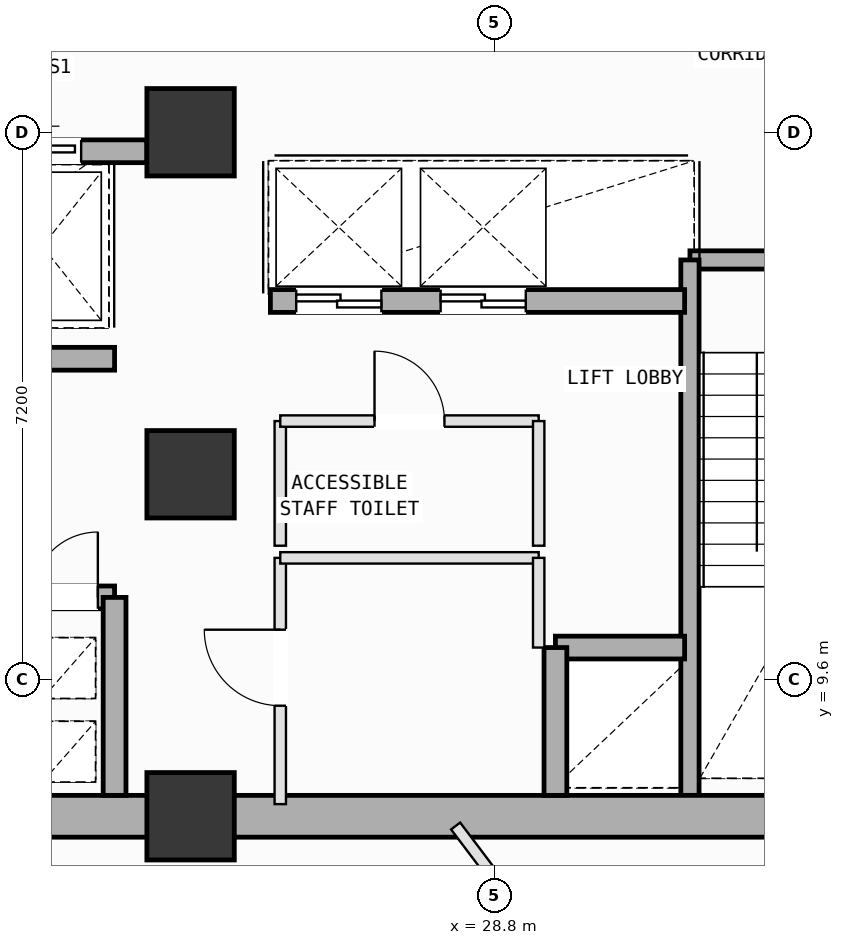
"""IFC4 building model, lengths in metres.
Left out: names, types, materials, properties, quantities, classifications, styles, units other than length and angle.
Written with IfcOpenShell. Run it as: python <this file> out.ifc"""

import sys

from ifc_helpers import new_model, si_unit, direction, frame, frame_2d, origin, origin_2d, place, context, subcontext, project, spatial, rectangle, extrude, element, fill, save


model = new_model("IFC4")
c1 = context("Model", 3, precision=1e-05, world=origin(), true_north=direction((0.0, 1.0)))
c2 = subcontext(c1, "Body", "Model", "MODEL_VIEW")
j1 = project(units=[si_unit("LENGTHUNIT", "METRE"), si_unit("PLANEANGLEUNIT", "RADIAN")], contexts=[c1])
p1 = place(None, origin())
s1 = spatial("IfcSite", under=j1, at=p1, CompositionType="ELEMENT")
p2 = place(p1, origin())
s2 = spatial("IfcBuilding", under=s1, at=p2, CompositionType="ELEMENT")
p3 = place(p2, frame((0.0, 0.0, 181.8)))
s3 = spatial("IfcBuildingStorey", under=s2, at=p3, CompositionType="ELEMENT", Elevation=181.8)
for number, where, z_axis, x_axis in (
    (1, (24.8, 7.8, 0.0), (0.0, 0.0, 1.0), (1.0, 0.0, 0.0)),
    (2, (24.8, 12.3, 0.0), (0.0, 0.0, 1.0), (1.0, 0.0, 0.0)),
    (3, (24.8, 16.8, 0.0), (0.0, 0.0, 1.0), (1.0, 0.0, 0.0)),
):
    element("IfcColumn", number, at=place(p3, frame(where, z_axis=z_axis, x_axis=x_axis)), inside=s3, PredefinedType="COLUMN", context=c2, shape_type="SweptSolid", body=[
        extrude(rectangle(XDim=1.15, YDim=1.15, at=origin_2d()), origin(), (0.0, 0.0, 1.0), 4.0),
    ])
p4 = place(p3, frame((31.37, 15.12, 0.0), z_axis=(0.0, 0.0, 1.0), x_axis=(1.0, 0.0, 0.0)))
e4 = element("IfcWall", 4, at=p4, inside=s3, PredefinedType="SOLIDWALL", context=c2, shape_type="SweptSolid", body=[
    extrude(rectangle(XDim=3.46, YDim=0.24, at=frame_2d((1.73, 0.0))), origin(), (0.0, 0.0, 1.0), 3.78),
])
p5 = place(p4, frame((2.14, 0.0, 0.0)))
e5 = element("IfcOpeningElement", 5, at=p5, cuts=e4, PredefinedType="OPENING", context=c2, shape_type="SweptSolid", body=[
    extrude(rectangle(XDim=1.1, YDim=2.15, at=frame_2d((0.55, 1.075))), frame((0.0, 0.13, 0.0), z_axis=(0.0, -1.0, 0.0), x_axis=(1.0, 0.0, 0.0)), (0.0, 0.0, 1.0), 0.26),
])
p6 = place(p3, frame((31.37, 8.075, 0.0), z_axis=(0.0, 0.0, 1.0), x_axis=(0.0, 1.0, 0.0)))
e6 = element("IfcWall", 6, at=p6, inside=s3, PredefinedType="SOLIDWALL", context=c2, shape_type="SweptSolid", body=[
    extrude(rectangle(XDim=7.045, YDim=0.24, at=frame_2d((3.522, 0.0))), origin(), (0.0, 0.0, 1.0), 3.78),
])
for number, where, z_axis, x_axis in (
    (7, (14.0, 7.8, 0.0), (0.0, 0.0, 1.0), (1.0, 0.0, 0.0)),
    (8, (24.8, 7.8, 0.0), (0.0, 0.0, 1.0), (1.0, 0.0, 0.0)),
):
    element("IfcWall", number, at=place(p3, frame(where, z_axis=z_axis, x_axis=x_axis)), inside=s3, PredefinedType="SHEAR", context=c2, shape_type="SweptSolid", body=[
        extrude(rectangle(XDim=10.8, YDim=0.55, at=frame_2d((5.4, 0.0))), origin(), (0.0, 0.0, 1.0), 3.78),
    ])
p7 = place(p3, frame((19.85, 16.55, 0.0), z_axis=(0.0, 0.0, 1.0), x_axis=(1.0, 0.0, 0.0)))
e9 = element("IfcWall", 9, at=p7, inside=s3, PredefinedType="SOLIDWALL", context=c2, shape_type="SweptSolid", body=[
    extrude(rectangle(XDim=4.375, YDim=0.3, at=frame_2d((2.188, 0.0))), origin(), (0.0, 0.0, 1.0), 3.78),
])
p8 = place(p7, frame((0.475, 0.0, 0.0)))
e10 = element("IfcOpeningElement", 10, at=p8, cuts=e9, PredefinedType="OPENING", context=c2, shape_type="SweptSolid", body=[
    extrude(rectangle(XDim=1.25, YDim=2.18, at=frame_2d((0.625, 1.09))), frame((0.0, 0.16, 0.0), z_axis=(0.0, -1.0, 0.0), x_axis=(1.0, 0.0, 0.0)), (0.0, 0.0, 1.0), 0.32),
])
p9 = place(p7, frame((2.49, 0.0, 0.0)))
e11 = element("IfcOpeningElement", 11, at=p9, cuts=e9, PredefinedType="OPENING", context=c2, shape_type="SweptSolid", body=[
    extrude(rectangle(XDim=1.02, YDim=2.12, at=frame_2d((0.51, 1.06))), frame((0.0, 0.16, 0.0), z_axis=(0.0, -1.0, 0.0), x_axis=(1.0, 0.0, 0.0)), (0.0, 0.0, 1.0), 0.32),
])
p10 = place(p3, frame((18.5, 10.68, 0.0), z_axis=(0.0, 0.0, 1.0), x_axis=(1.0, 0.0, 0.0)))
e12 = element("IfcWall", 12, at=p10, inside=s3, PredefinedType="SOLIDWALL", context=c2, shape_type="SweptSolid", body=[
    extrude(rectangle(XDim=5.3, YDim=0.3, at=frame_2d((2.65, 0.0))), origin(), (0.0, 0.0, 1.0), 3.78),
])
p11 = place(p10, frame((4.22, 0.0, 0.0)))
e13 = element("IfcOpeningElement", 13, at=p11, cuts=e12, PredefinedType="OPENING", context=c2, shape_type="SweptSolid", body=[
    extrude(rectangle(XDim=0.86, YDim=2.06, at=frame_2d((0.43, 1.03))), frame((0.0, 0.16, 0.0), z_axis=(0.0, -1.0, 0.0), x_axis=(1.0, 0.0, 0.0)), (0.0, 0.0, 1.0), 0.32),
])
p12 = place(p10, frame((0.425, 0.0, 0.0)))
e14 = element("IfcOpeningElement", 14, at=p12, cuts=e12, PredefinedType="OPENING", context=c2, shape_type="SweptSolid", body=[
    extrude(rectangle(XDim=1.25, YDim=2.18, at=frame_2d((0.625, 1.09))), frame((0.0, 0.16, 0.0), z_axis=(0.0, -1.0, 0.0), x_axis=(1.0, 0.0, 0.0)), (0.0, 0.0, 1.0), 0.32),
])
p13 = place(p10, frame((2.525, 0.0, 0.0)))
e15 = element("IfcOpeningElement", 15, at=p13, cuts=e12, PredefinedType="OPENING", context=c2, shape_type="SweptSolid", body=[
    extrude(rectangle(XDim=1.25, YDim=2.18, at=frame_2d((0.625, 1.09))), frame((0.0, 0.16, 0.0), z_axis=(0.0, -1.0, 0.0), x_axis=(1.0, 0.0, 0.0)), (0.0, 0.0, 1.0), 0.32),
])
p14 = place(p3, frame((18.5, 13.82, 0.0), z_axis=(0.0, 0.0, 1.0), x_axis=(1.0, 0.0, 0.0)))
e16 = element("IfcWall", 16, at=p14, inside=s3, PredefinedType="SOLIDWALL", context=c2, shape_type="SweptSolid", body=[
    extrude(rectangle(XDim=5.3, YDim=0.3, at=frame_2d((2.65, 0.0))), origin(), (0.0, 0.0, 1.0), 3.78),
])
p15 = place(p14, frame((0.18, 0.0, 0.0)))
e17 = element("IfcOpeningElement", 17, at=p15, cuts=e16, PredefinedType="OPENING", context=c2, shape_type="SweptSolid", body=[
    extrude(rectangle(XDim=1.1, YDim=2.15, at=frame_2d((0.55, 1.075))), frame((0.0, 0.16, 0.0), z_axis=(0.0, -1.0, 0.0), x_axis=(1.0, 0.0, 0.0)), (0.0, 0.0, 1.0), 0.32),
])
p16 = place(p3, frame((23.8, 8.075, 0.0), z_axis=(0.0, 0.0, 1.0), x_axis=(0.0, 1.0, 0.0)))
e18 = element("IfcWall", 18, at=p16, inside=s3, PredefinedType="SOLIDWALL", context=c2, shape_type="SweptSolid", body=[
    extrude(rectangle(XDim=2.605, YDim=0.3, at=frame_2d((1.302, 0.0))), origin(), (0.0, 0.0, 1.0), 3.78),
])
p17 = place(p3, frame((29.6, 10.02, 0.0), z_axis=(0.0, 0.0, 1.0), x_axis=(1.0, 0.0, 0.0)))
e19 = element("IfcWall", 19, at=p17, inside=s3, PredefinedType="SOLIDWALL", context=c2, shape_type="SweptSolid", body=[
    extrude(rectangle(XDim=1.7, YDim=0.3, at=frame_2d((0.85, 0.0))), origin(), (0.0, 0.0, 1.0), 3.78),
])
p18 = place(p3, frame((29.6, 8.075, 0.0), z_axis=(0.0, 0.0, 1.0), x_axis=(0.0, 1.0, 0.0)))
e20 = element("IfcWall", 20, at=p18, inside=s3, PredefinedType="SOLIDWALL", context=c2, shape_type="SweptSolid", body=[
    extrude(rectangle(XDim=1.945, YDim=0.3, at=frame_2d((0.973, 0.0))), origin(), (0.0, 0.0, 1.0), 3.78),
])
p19 = place(p3, frame((25.85, 14.58, 0.0), z_axis=(0.0, 0.0, 1.0), x_axis=(1.0, 0.0, 0.0)))
e21 = element("IfcWall", 21, at=p19, inside=s3, PredefinedType="SOLIDWALL", context=c2, shape_type="SweptSolid", body=[
    extrude(rectangle(XDim=5.45, YDim=0.3, at=frame_2d((2.725, 0.0))), origin(), (0.0, 0.0, 1.0), 3.78),
])
p20 = place(p19, frame((0.34, 0.0, 0.0)))
e22 = element("IfcOpeningElement", 22, at=p20, cuts=e21, PredefinedType="OPENING", context=c2, shape_type="SweptSolid", body=[
    extrude(rectangle(XDim=1.12, YDim=2.15, at=frame_2d((0.56, 1.075))), frame((0.0, 0.16, 0.0), z_axis=(0.0, -1.0, 0.0), x_axis=(1.0, 0.0, 0.0)), (0.0, 0.0, 1.0), 0.32),
])
p21 = place(p19, frame((2.24, 0.0, 0.0)))
e23 = element("IfcOpeningElement", 23, at=p21, cuts=e21, PredefinedType="OPENING", context=c2, shape_type="SweptSolid", body=[
    extrude(rectangle(XDim=1.12, YDim=2.15, at=frame_2d((0.56, 1.075))), frame((0.0, 0.16, 0.0), z_axis=(0.0, -1.0, 0.0), x_axis=(1.0, 0.0, 0.0)), (0.0, 0.0, 1.0), 0.32),
])
p22 = place(p3, frame((25.98, 7.96, 0.0), z_axis=(0.0, 0.0, 1.0), x_axis=(0.0, 1.0, 0.0)))
e24 = element("IfcWall", 24, at=p22, inside=s3, PredefinedType="PARTITIONING", context=c2, shape_type="SweptSolid", body=[
    extrude(rectangle(XDim=3.24, YDim=0.15, at=frame_2d((1.62, 0.0))), origin(), (0.0, 0.0, 1.0), 3.78),
])
p23 = place(p22, frame((1.295, 0.0, 0.0)))
e25 = element("IfcOpeningElement", 25, at=p23, cuts=e24, PredefinedType="OPENING", context=c2, shape_type="SweptSolid", body=[
    extrude(rectangle(XDim=1.0, YDim=2.12, at=frame_2d((0.5, 1.06))), frame((0.0, 0.085, 0.0), z_axis=(0.0, -1.0, 0.0), x_axis=(1.0, 0.0, 0.0)), (0.0, 0.0, 1.0), 0.17),
])
p24 = place(p3, frame((25.98, 11.2, 0.0), z_axis=(0.0, 0.0, 1.0), x_axis=(1.0, 0.0, 0.0)))
e26 = element("IfcWall", 26, at=p24, inside=s3, PredefinedType="PARTITIONING", context=c2, shape_type="SweptSolid", body=[
    extrude(rectangle(XDim=3.4, YDim=0.15, at=frame_2d((1.7, 0.0))), origin(), (0.0, 0.0, 1.0), 3.78),
])
p25 = place(p3, frame((29.38, 11.2, 0.0), z_axis=(0.0, 0.0, 1.0), x_axis=(0.0, -1.0, 0.0)))
e27 = element("IfcWall", 27, at=p25, inside=s3, PredefinedType="PARTITIONING", context=c2, shape_type="SweptSolid", body=[
    extrude(rectangle(XDim=1.18, YDim=0.15, at=frame_2d((0.59, 0.0))), origin(), (0.0, 0.0, 1.0), 3.78),
])
p26 = place(p3, frame((25.98, 11.36, 0.0), z_axis=(0.0, 0.0, 1.0), x_axis=(0.0, 1.0, 0.0)))
e28 = element("IfcWall", 28, at=p26, inside=s3, PredefinedType="PARTITIONING", context=c2, shape_type="SweptSolid", body=[
    extrude(rectangle(XDim=1.64, YDim=0.15, at=frame_2d((0.82, 0.0))), origin(), (0.0, 0.0, 1.0), 3.78),
])
p27 = place(p3, frame((25.98, 13.0, 0.0), z_axis=(0.0, 0.0, 1.0), x_axis=(1.0, 0.0, 0.0)))
e29 = element("IfcWall", 29, at=p27, inside=s3, PredefinedType="PARTITIONING", context=c2, shape_type="SweptSolid", body=[
    extrude(rectangle(XDim=3.4, YDim=0.15, at=frame_2d((1.7, 0.0))), origin(), (0.0, 0.0, 1.0), 3.78),
])
p28 = place(p27, frame((1.24, 0.0, 0.0)))
e30 = element("IfcOpeningElement", 30, at=p28, cuts=e29, PredefinedType="OPENING", context=c2, shape_type="SweptSolid", body=[
    extrude(rectangle(XDim=0.92, YDim=2.1, at=frame_2d((0.46, 1.05))), frame((0.0, 0.085, 0.0), z_axis=(0.0, -1.0, 0.0), x_axis=(1.0, 0.0, 0.0)), (0.0, 0.0, 1.0), 0.17),
])
p29 = place(p3, frame((29.38, 13.0, 0.0), z_axis=(0.0, 0.0, 1.0), x_axis=(0.0, -1.0, 0.0)))
e31 = element("IfcWall", 31, at=p29, inside=s3, PredefinedType="PARTITIONING", context=c2, shape_type="SweptSolid", body=[
    extrude(rectangle(XDim=1.64, YDim=0.15, at=frame_2d((0.82, 0.0))), origin(), (0.0, 0.0, 1.0), 3.78),
])
p30 = place(p3, frame((28.287, 7.672, 0.0), z_axis=(0.0, 0.0, 1.0), x_axis=(0.602494949449, -0.798122694758, 0.0)))
e32 = element("IfcWall", 32, at=p30, inside=s3, PredefinedType="PARTITIONING", context=c2, shape_type="SweptSolid", body=[
    extrude(rectangle(XDim=11.666, YDim=0.15, at=frame_2d((5.833, 0.0))), origin(), (0.0, 0.0, 1.0), 3.78),
])
p31 = place(p30, frame((5.591, 0.0, 0.0)))
e33 = element("IfcOpeningElement", 33, at=p31, cuts=e32, PredefinedType="OPENING", context=c2, shape_type="SweptSolid", body=[
    extrude(rectangle(XDim=0.86, YDim=2.06, at=frame_2d((0.43, 1.03))), frame((0.0, 0.085, 0.0), z_axis=(0.0, -1.0, 0.0), x_axis=(1.0, 0.0, 0.0)), (0.0, 0.0, 1.0), 0.17),
])
p32 = place(p11, origin())
e34 = element("IfcDoor", 34, at=p32, inside=s3, OperationType="SINGLE_SWING_RIGHT", PredefinedType="DOOR", context=c2, shape_type="SweptSolid", body=[
    extrude(rectangle(XDim=0.86, YDim=2.06, at=frame_2d((0.43, 1.03))), frame((0.0, 0.025, 0.0), z_axis=(0.0, -1.0, 0.0), x_axis=(1.0, 0.0, 0.0)), (0.0, 0.0, 1.0), 0.05),
])
fill(e13, e34)
p33 = place(p20, origin())
e35 = element("IfcDoor", 35, at=p33, inside=s3, OperationType="DOUBLE_DOOR_SLIDING", PredefinedType="DOOR", context=c2, shape_type="SweptSolid", body=[
    extrude(rectangle(XDim=1.12, YDim=2.15, at=frame_2d((0.56, 1.075))), frame((0.0, 0.025, 0.0), z_axis=(0.0, -1.0, 0.0), x_axis=(1.0, 0.0, 0.0)), (0.0, 0.0, 1.0), 0.05),
])
fill(e22, e35)
p34 = place(p21, origin())
e36 = element("IfcDoor", 36, at=p34, inside=s3, OperationType="DOUBLE_DOOR_SLIDING", PredefinedType="DOOR", context=c2, shape_type="SweptSolid", body=[
    extrude(rectangle(XDim=1.12, YDim=2.15, at=frame_2d((0.56, 1.075))), frame((0.0, 0.025, 0.0), z_axis=(0.0, -1.0, 0.0), x_axis=(1.0, 0.0, 0.0)), (0.0, 0.0, 1.0), 0.05),
])
fill(e23, e36)
p35 = place(p9, origin())
e37 = element("IfcDoor", 37, at=p35, inside=s3, OperationType="SLIDING_TO_LEFT", PredefinedType="DOOR", context=c2, shape_type="SweptSolid", body=[
    extrude(rectangle(XDim=1.02, YDim=2.12, at=frame_2d((0.51, 1.06))), frame((0.0, 0.025, 0.0), z_axis=(0.0, -1.0, 0.0), x_axis=(1.0, 0.0, 0.0)), (0.0, 0.0, 1.0), 0.05),
])
fill(e11, e37)
p36 = place(p23, origin())
e38 = element("IfcDoor", 38, at=p36, inside=s3, OperationType="SINGLE_SWING_RIGHT", PredefinedType="DOOR", context=c2, shape_type="SweptSolid", body=[
    extrude(rectangle(XDim=1.0, YDim=2.12, at=frame_2d((0.5, 1.06))), frame((0.0, 0.025, 0.0), z_axis=(0.0, -1.0, 0.0), x_axis=(1.0, 0.0, 0.0)), (0.0, 0.0, 1.0), 0.05),
])
fill(e25, e38)
p37 = place(p28, origin())
e39 = element("IfcDoor", 39, at=p37, inside=s3, OperationType="SINGLE_SWING_LEFT", PredefinedType="DOOR", context=c2, shape_type="SweptSolid", body=[
    extrude(rectangle(XDim=0.92, YDim=2.1, at=frame_2d((0.46, 1.05))), frame((0.0, 0.025, 0.0), z_axis=(0.0, -1.0, 0.0), x_axis=(1.0, 0.0, 0.0)), (0.0, 0.0, 1.0), 0.05),
])
fill(e30, e39)
save(model, sys.argv[1])
